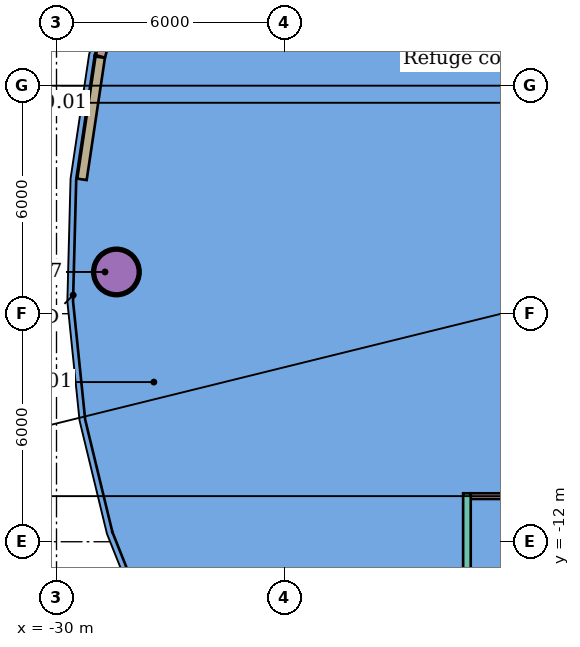
"""IFC4 building model, lengths in metres.
Left out: names, types, materials, properties, quantities, classifications, styles, units other than length and angle.
Written with IfcOpenShell. Run it as: python <this file> out.ifc"""

import sys

from ifc_helpers import new_model, si_unit, direction, frame, frame_2d, origin, origin_2d, place, context, subcontext, project, spatial, rectangle, hollow_circle, extrude, element, save


model = new_model("IFC4")
c1 = context("Model", 3, precision=1e-05, world=origin(), true_north=direction((0.0, 1.0)))
c2 = subcontext(c1, "Body", "Model", "MODEL_VIEW")
j1 = project(units=[si_unit("LENGTHUNIT", "METRE"), si_unit("PLANEANGLEUNIT", "RADIAN")], contexts=[c1])
p1 = place(None, origin())
s1 = spatial("IfcSite", under=j1, at=p1, CompositionType="ELEMENT")
p2 = place(p1, origin())
s2 = spatial("IfcBuilding", under=s1, at=p2, CompositionType="ELEMENT")
p3 = place(p2, frame((0.0, 0.0, 242.5)))
s3 = spatial("IfcBuildingStorey", under=s2, at=p3, CompositionType="ELEMENT", Elevation=242.5)
p4 = place(p3, frame((-28.424, -4.901, 0.0), z_axis=(0.0, 0.0, 1.0), x_axis=(1.0, 0.0, 0.0)))
e1 = element("IfcColumn", 1, at=p4, inside=s3, PredefinedType="COLUMN", context=c2, shape_type="SweptSolid", body=[
    extrude(hollow_circle(Radius=0.6, WallThickness=0.045, at=origin_2d()), origin(), (0.0, 0.0, 1.0), 3.4),
])
p5 = place(p3, frame((-19.1, -10.8, 0.0), z_axis=(0.0, 0.0, 1.0), x_axis=(1.0, 0.0, 0.0)))
e2 = element("IfcWall", 2, at=p5, inside=s3, PredefinedType="PARTITIONING", context=c2, shape_type="SweptSolid", body=[
    extrude(rectangle(XDim=7.6, YDim=0.15, at=frame_2d((3.8, 0.0))), origin(), (0.0, 0.0, 1.0), 3.4),
])
p6 = place(p5, frame((3.586, 0.0, 0.0)))
e3 = element("IfcOpeningElement", 3, at=p6, cuts=e2, PredefinedType="OPENING", context=c2, shape_type="SweptSolid", body=[
    extrude(rectangle(XDim=0.9, YDim=2.1, at=frame_2d((0.45, 1.05))), frame((0.0, 0.085, 0.0), z_axis=(0.0, -1.0, 0.0), x_axis=(1.0, 0.0, 0.0)), (0.0, 0.0, 1.0), 0.17),
])
p7 = place(p3, frame((-19.2, -10.725, 0.0), z_axis=(0.0, 0.0, 1.0), x_axis=(0.0, -1.0, 0.0)))
e4 = element("IfcWall", 4, at=p7, inside=s3, PredefinedType="PARTITIONING", context=c2, shape_type="SweptSolid", body=[
    extrude(rectangle(XDim=4.975, YDim=0.2, at=frame_2d((2.487, 0.0))), origin(), (0.0, 0.0, 1.0), 3.4),
])
p8 = place(p7, frame((2.382, 0.0, 0.0)))
e5 = element("IfcOpeningElement", 5, at=p8, cuts=e4, PredefinedType="OPENING", context=c2, shape_type="SweptSolid", body=[
    extrude(rectangle(XDim=0.9, YDim=2.1, at=frame_2d((0.45, 1.05))), frame((0.0, 0.11, 0.0), z_axis=(0.0, -1.0, 0.0), x_axis=(1.0, 0.0, 0.0)), (0.0, 0.0, 1.0), 0.22),
])
p9 = place(p3, frame((-27.975, 3.973, 0.0), z_axis=(0.0, 0.0, 1.0), x_axis=(-0.262133680593, -0.965031571244, 0.0)))
e6 = element("IfcWall", 6, at=p9, inside=s3, PredefinedType="SOLIDWALL", context=c2, shape_type="SweptSolid", body=[
    extrude(rectangle(XDim=3.318, YDim=0.25, at=frame_2d((1.659, 0.0))), origin(), (0.0, 0.0, 1.0), 3.05),
])
p10 = place(p3, frame((-28.85, 0.749, 0.0), z_axis=(0.0, 0.0, 1.0), x_axis=(-0.147814951337, -0.989015035357, 0.0)))
e7 = element("IfcWall", 7, at=p10, inside=s3, PredefinedType="SOLIDWALL", context=c2, shape_type="SweptSolid", body=[
    extrude(rectangle(XDim=3.249, YDim=0.25, at=frame_2d((1.625, 0.0))), origin(), (0.0, 0.0, 1.0), 3.4),
])
save(model, sys.argv[1])
